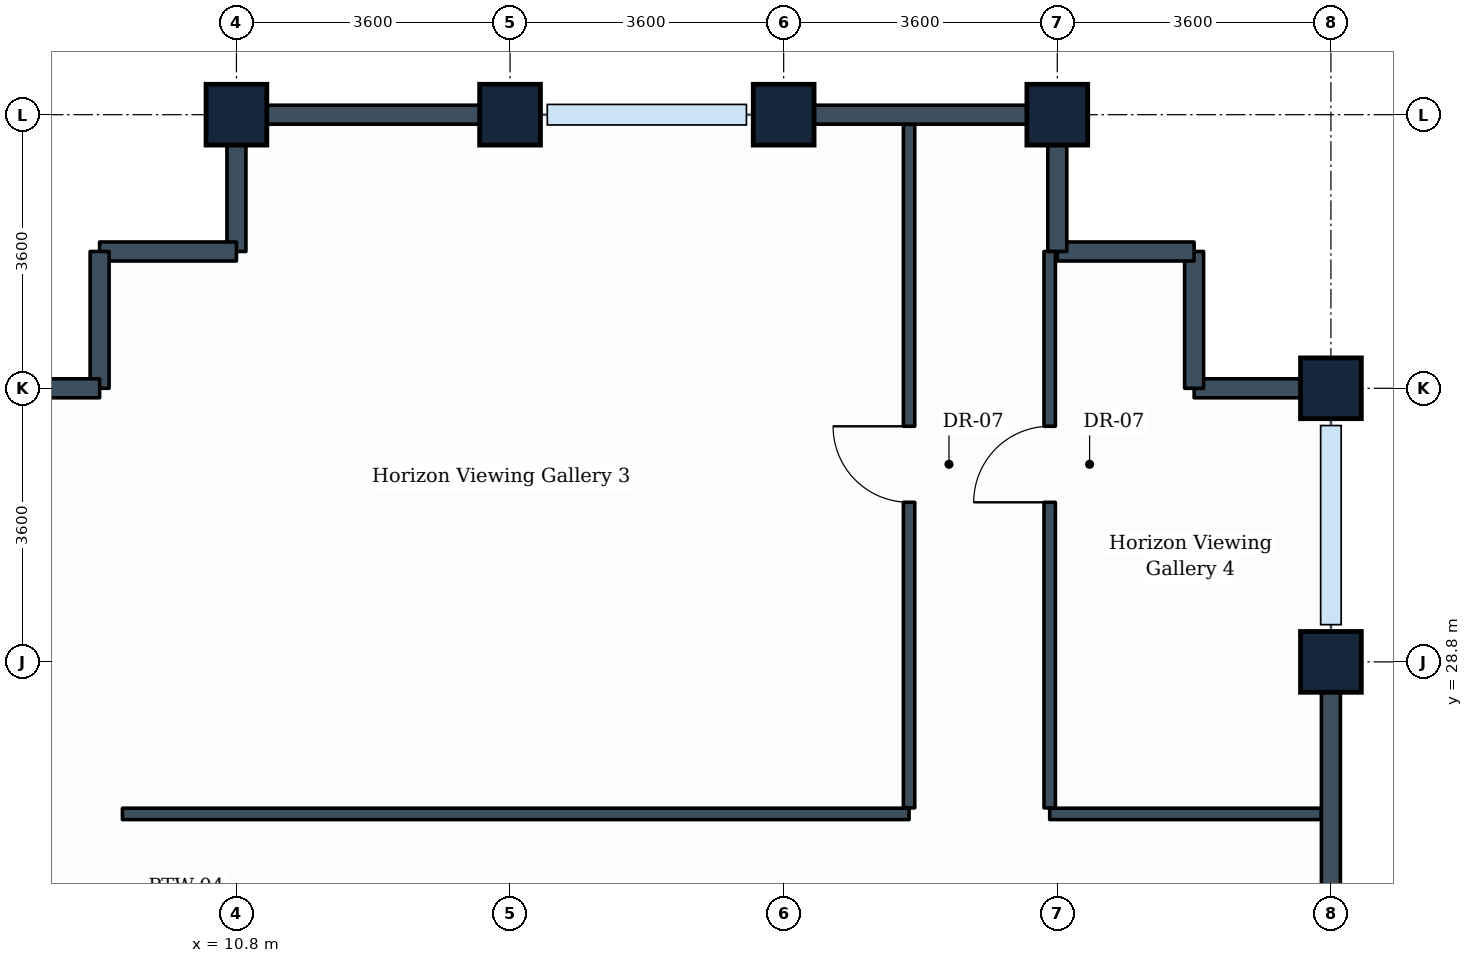
"""IFC4 building model, lengths in metres.
Left out: names, types, materials, properties, quantities, classifications, styles, units other than length and angle.
Written with IfcOpenShell. Run it as: python <this file> out.ifc"""

import sys

from ifc_helpers import new_model, si_unit, direction, frame, frame_2d, origin, origin_2d, place, context, subcontext, project, spatial, rectangle, extrude, element, fill, save


model = new_model("IFC4")
c1 = context("Model", 3, precision=1e-05, world=origin(), true_north=direction((0.0, 1.0)))
c2 = subcontext(c1, "Body", "Model", "MODEL_VIEW")
j1 = project(units=[si_unit("LENGTHUNIT", "METRE"), si_unit("PLANEANGLEUNIT", "RADIAN")], contexts=[c1])
p1 = place(None, origin())
s1 = spatial("IfcSite", under=j1, at=p1, CompositionType="ELEMENT")
p2 = place(p1, origin())
s2 = spatial("IfcBuilding", under=s1, at=p2, CompositionType="ELEMENT")
p3 = place(p2, frame((0.0, 0.0, 299.8)))
s3 = spatial("IfcBuildingStorey", under=s2, at=p3, CompositionType="ELEMENT", Elevation=299.8)
for number, where, z_axis, x_axis in (
    (1, (10.8, 36.0, 0.0), (0.0, 0.0, 1.0), (1.0, 0.0, 0.0)),
    (2, (14.4, 36.0, 0.0), (0.0, 0.0, 1.0), (1.0, 0.0, 0.0)),
    (3, (18.0, 36.0, 0.0), (0.0, 0.0, 1.0), (1.0, 0.0, 0.0)),
    (4, (21.6, 36.0, 0.0), (0.0, 0.0, 1.0), (1.0, 0.0, 0.0)),
    (5, (25.2, 28.8, 0.0), (0.0, 0.0, 1.0), (0.0, 1.0, 0.0)),
    (6, (25.2, 32.4, 0.0), (0.0, 0.0, 1.0), (0.0, 1.0, 0.0)),
):
    element("IfcColumn", number, at=place(p3, frame(where, z_axis=z_axis, x_axis=x_axis)), inside=s3, PredefinedType="COLUMN", context=c2, shape_type="SweptSolid", body=[
        extrude(rectangle(XDim=0.8, YDim=0.8, at=origin_2d()), origin(), (0.0, 0.0, 1.0), 4.4),
    ])
p4 = place(p3, frame((25.2, 28.8, 0.0), z_axis=(0.0, 0.0, 1.0), x_axis=(0.0, -1.0, 0.0)))
e7 = element("IfcWall", 7, at=p4, inside=s3, PredefinedType="STANDARD", context=c2, shape_type="SweptSolid", body=[
    extrude(rectangle(XDim=3.6, YDim=0.25, at=frame_2d((1.8, 0.0))), origin(), (0.0, 0.0, 1.0), 2.58),
])
p5 = place(p3, frame((23.4, 32.4, 0.0), z_axis=(0.0, 0.0, 1.0), x_axis=(1.0, 0.0, 0.0)))
e8 = element("IfcWall", 8, at=p5, inside=s3, PredefinedType="STANDARD", context=c2, shape_type="SweptSolid", body=[
    extrude(rectangle(XDim=1.8, YDim=0.25, at=frame_2d((0.9, 0.0))), origin(), (0.0, 0.0, 1.0), 2.58),
])
p6 = place(p3, frame((23.4, 32.4, 0.0), z_axis=(0.0, 0.0, 1.0), x_axis=(0.0, 1.0, 0.0)))
e9 = element("IfcWall", 9, at=p6, inside=s3, PredefinedType="STANDARD", context=c2, shape_type="SweptSolid", body=[
    extrude(rectangle(XDim=1.8, YDim=0.25, at=frame_2d((0.9, 0.0))), origin(), (0.0, 0.0, 1.0), 4.135),
])
p7 = place(p3, frame((21.6, 34.2, 0.0), z_axis=(0.0, 0.0, 1.0), x_axis=(1.0, 0.0, 0.0)))
e10 = element("IfcWall", 10, at=p7, inside=s3, PredefinedType="STANDARD", context=c2, shape_type="SweptSolid", body=[
    extrude(rectangle(XDim=1.8, YDim=0.25, at=frame_2d((0.9, 0.0))), origin(), (0.0, 0.0, 1.0), 4.135),
])
p8 = place(p3, frame((21.6, 34.2, 0.0), z_axis=(0.0, 0.0, 1.0), x_axis=(0.0, 1.0, 0.0)))
e11 = element("IfcWall", 11, at=p8, inside=s3, PredefinedType="STANDARD", context=c2, shape_type="SweptSolid", body=[
    extrude(rectangle(XDim=1.8, YDim=0.25, at=frame_2d((0.9, 0.0))), origin(), (0.0, 0.0, 1.0), 2.58),
])
p9 = place(p3, frame((18.0, 36.0, 0.0), z_axis=(0.0, 0.0, 1.0), x_axis=(1.0, 0.0, 0.0)))
e12 = element("IfcWall", 12, at=p9, inside=s3, PredefinedType="STANDARD", context=c2, shape_type="SweptSolid", body=[
    extrude(rectangle(XDim=3.6, YDim=0.25, at=frame_2d((1.8, 0.0))), origin(), (0.0, 0.0, 1.0), 2.58),
])
p10 = place(p3, frame((10.8, 36.0, 0.0), z_axis=(0.0, 0.0, 1.0), x_axis=(1.0, 0.0, 0.0)))
e13 = element("IfcWall", 13, at=p10, inside=s3, PredefinedType="STANDARD", context=c2, shape_type="SweptSolid", body=[
    extrude(rectangle(XDim=3.6, YDim=0.25, at=frame_2d((1.8, 0.0))), origin(), (0.0, 0.0, 1.0), 2.58),
])
for number, where, z_axis, x_axis in (
    (14, (10.8, 34.2, 0.0), (0.0, 0.0, 1.0), (0.0, 1.0, 0.0)),
    (15, (9.0, 34.2, 0.0), (0.0, 0.0, 1.0), (1.0, 0.0, 0.0)),
    (16, (9.0, 32.4, 0.0), (0.0, 0.0, 1.0), (0.0, 1.0, 0.0)),
    (17, (7.2, 32.4, 0.0), (0.0, 0.0, 1.0), (1.0, 0.0, 0.0)),
):
    element("IfcWall", number, at=place(p3, frame(where, z_axis=z_axis, x_axis=x_axis)), inside=s3, PredefinedType="STANDARD", context=c2, shape_type="SweptSolid", body=[
        extrude(rectangle(XDim=1.8, YDim=0.25, at=frame_2d((0.9, 0.0))), origin(), (0.0, 0.0, 1.0), 2.58),
    ])
p11 = place(p3, frame((9.3, 26.8, 0.0), z_axis=(0.0, 0.0, 1.0), x_axis=(1.0, 0.0, 0.0)))
e18 = element("IfcWall", 18, at=p11, inside=s3, PredefinedType="PARTITIONING", context=c2, shape_type="SweptSolid", body=[
    extrude(rectangle(XDim=10.35, YDim=0.15, at=frame_2d((5.175, 0.0))), origin(), (0.0, 0.0, 1.0), 2.58),
])
p12 = place(p3, frame((19.65, 26.879, 0.0), z_axis=(0.0, 0.0, 1.0), x_axis=(0.0, 1.0, 0.0)))
e19 = element("IfcWall", 19, at=p12, inside=s3, PredefinedType="PARTITIONING", context=c2, shape_type="SweptSolid", body=[
    extrude(rectangle(XDim=8.992, YDim=0.15, at=frame_2d((4.496, 0.0))), origin(), (0.0, 0.0, 1.0), 2.58),
])
p13 = place(p12, frame((4.021, 0.0, 0.0)))
e20 = element("IfcOpeningElement", 20, at=p13, cuts=e19, PredefinedType="OPENING", context=c2, shape_type="SweptSolid", body=[
    extrude(rectangle(XDim=1.0, YDim=2.1, at=frame_2d((0.5, 1.05))), frame((0.0, 0.085, 0.0), z_axis=(0.0, -1.0, 0.0), x_axis=(1.0, 0.0, 0.0)), (0.0, 0.0, 1.0), 0.17),
])
p14 = place(p3, frame((21.5, 26.8, 0.0), z_axis=(0.0, 0.0, 1.0), x_axis=(1.0, 0.0, 0.0)))
e21 = element("IfcWall", 21, at=p14, inside=s3, PredefinedType="PARTITIONING", context=c2, shape_type="SweptSolid", body=[
    extrude(rectangle(XDim=3.571, YDim=0.15, at=frame_2d((1.786, 0.0))), origin(), (0.0, 0.0, 1.0), 2.58),
])
p15 = place(p3, frame((21.5, 26.879, 0.0), z_axis=(0.0, 0.0, 1.0), x_axis=(0.0, 1.0, 0.0)))
e22 = element("IfcWall", 22, at=p15, inside=s3, PredefinedType="PARTITIONING", context=c2, shape_type="SweptSolid", body=[
    extrude(rectangle(XDim=7.321, YDim=0.15, at=frame_2d((3.661, 0.0))), origin(), (0.0, 0.0, 1.0), 2.58),
])
p16 = place(p15, frame((4.021, 0.0, 0.0)))
e23 = element("IfcOpeningElement", 23, at=p16, cuts=e22, PredefinedType="OPENING", context=c2, shape_type="SweptSolid", body=[
    extrude(rectangle(XDim=1.0, YDim=2.1, at=frame_2d((0.5, 1.05))), frame((0.0, 0.085, 0.0), z_axis=(0.0, -1.0, 0.0), x_axis=(1.0, 0.0, 0.0)), (0.0, 0.0, 1.0), 0.17),
])
p17 = place(p13, origin())
e24 = element("IfcDoor", 24, at=p17, inside=s3, OperationType="SINGLE_SWING_RIGHT", PredefinedType="DOOR", context=c2, shape_type="SweptSolid", body=[
    extrude(rectangle(XDim=1.0, YDim=2.1, at=frame_2d((0.5, 1.05))), frame((0.0, 0.025, 0.0), z_axis=(0.0, -1.0, 0.0), x_axis=(1.0, 0.0, 0.0)), (0.0, 0.0, 1.0), 0.05),
])
fill(e20, e24)
p18 = place(p16, origin())
e25 = element("IfcDoor", 25, at=p18, inside=s3, OperationType="SINGLE_SWING_LEFT", PredefinedType="DOOR", context=c2, shape_type="SweptSolid", body=[
    extrude(rectangle(XDim=1.0, YDim=2.1, at=frame_2d((0.5, 1.05))), frame((0.0, 0.025, 0.0), z_axis=(0.0, -1.0, 0.0), x_axis=(1.0, 0.0, 0.0)), (0.0, 0.0, 1.0), 0.05),
])
fill(e23, e25)
save(model, sys.argv[1])
